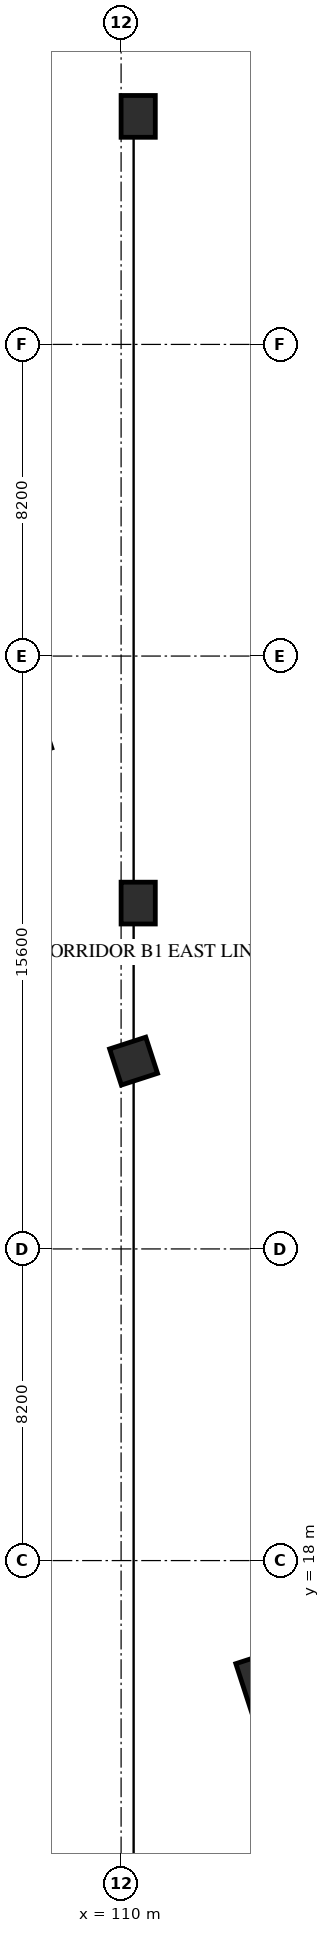
"""IFC4 building model, lengths in metres.
Left out: names, types, materials, properties, quantities, classifications, styles, units other than length and angle.
Written with IfcOpenShell. Run it as: python <this file> out.ifc"""

import sys

from ifc_helpers import new_model, si_unit, direction, frame, origin, origin_2d, place, context, subcontext, project, spatial, rectangle, hollow_rectangle, extrude, element, save


model = new_model("IFC4")
c1 = context("Model", 3, precision=1e-05, world=origin(), true_north=direction((0.0, 1.0)))
c2 = subcontext(c1, "Body", "Model", "MODEL_VIEW")
j1 = project(units=[si_unit("LENGTHUNIT", "METRE"), si_unit("PLANEANGLEUNIT", "RADIAN")], contexts=[c1])
p1 = place(None, origin())
s1 = spatial("IfcSite", under=j1, at=p1, CompositionType="ELEMENT")
p2 = place(p1, origin())
s2 = spatial("IfcBuilding", under=s1, at=p2, CompositionType="ELEMENT")
p3 = place(p2, frame((0.0, 0.0, -6.0)))
s3 = spatial("IfcBuildingStorey", under=s2, at=p3, CompositionType="ELEMENT", Elevation=-6.0)
p4 = place(p3, frame((110.45, 35.3, 0.0), z_axis=(0.0, 0.0, 1.0), x_axis=(1.0, 0.0, 0.0)))
e1 = element("IfcColumn", 1, at=p4, inside=s3, PredefinedType="COLUMN", context=c2, shape_type="SweptSolid", body=[
    extrude(rectangle(XDim=0.9, YDim=1.1, at=origin_2d()), origin(), (0.0, 0.0, 1.0), 3.08),
])
p5 = place(p3, frame((110.45, 56.0, 0.0), z_axis=(0.0, 0.0, 1.0), x_axis=(1.0, 0.0, 0.0)))
e2 = element("IfcColumn", 2, at=p5, inside=s3, PredefinedType="COLUMN", context=c2, shape_type="SweptSolid", body=[
    extrude(rectangle(XDim=0.9, YDim=1.1, at=origin_2d()), origin(), (0.0, 0.0, 1.0), 5.65),
])
p6 = place(p3, frame((114.027, 14.774, 0.0), z_axis=(0.0, 0.0, 1.0), x_axis=(0.951056516295, 0.309016994375, 0.0)))
e3 = element("IfcColumn", 3, at=p6, inside=s3, PredefinedType="COLUMN", context=c2, shape_type="SweptSolid", body=[
    extrude(hollow_rectangle(XDim=1.6, YDim=1.6, WallThickness=0.055, at=origin_2d()), origin(), (0.0, 0.0, 1.0), 6.001),
])
p7 = place(p3, frame((110.328, 31.142, 0.0), z_axis=(0.0, 0.0, 1.0), x_axis=(0.951056516295, 0.309016994375, 0.0)))
e4 = element("IfcColumn", 4, at=p7, inside=s3, PredefinedType="COLUMN", context=c2, shape_type="SweptSolid", body=[
    extrude(hollow_rectangle(XDim=1.0, YDim=1.0, WallThickness=0.036, at=origin_2d()), origin(), (0.0, 0.0, 1.0), 6.001),
])
save(model, sys.argv[1])
